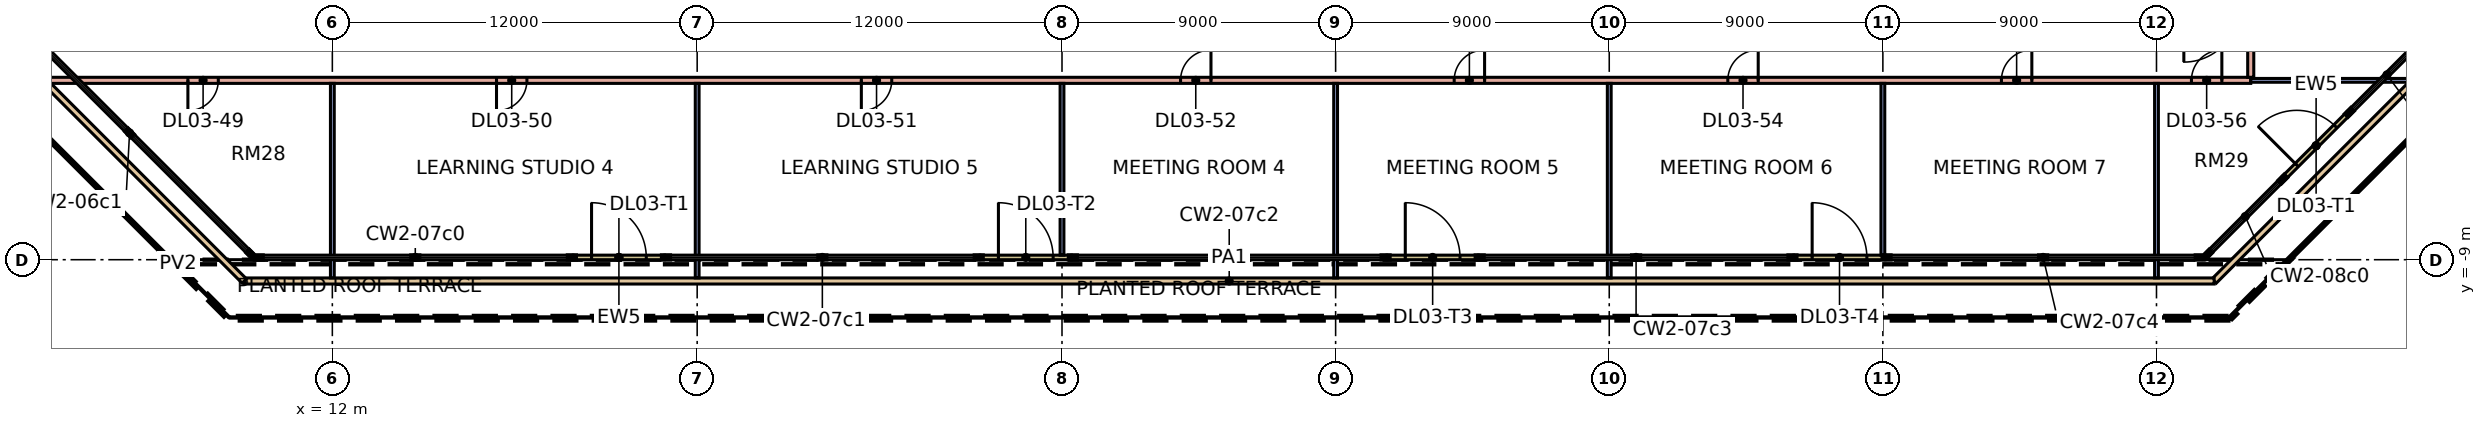
"""IFC4 building model, lengths in metres.
Left out: names, types, materials, properties, quantities, classifications, styles, units other than length and angle.
Written with IfcOpenShell. Run it as: python <this file> out.ifc"""

import sys

from ifc_helpers import new_model, si_unit, direction, frame, frame_2d, origin, place, context, subcontext, project, spatial, rectangle, extrude, element, fill, save


model = new_model("IFC4")
c1 = context("Model", 3, precision=1e-05, world=origin(), true_north=direction((0.0, 1.0)))
c2 = subcontext(c1, "Body", "Model", "MODEL_VIEW")
j1 = project(units=[si_unit("LENGTHUNIT", "METRE"), si_unit("PLANEANGLEUNIT", "RADIAN")], contexts=[c1])
p1 = place(None, origin())
s1 = spatial("IfcSite", under=j1, at=p1, CompositionType="ELEMENT")
p2 = place(p1, origin())
s2 = spatial("IfcBuilding", under=s1, at=p2, CompositionType="ELEMENT")
p3 = place(p2, frame((0.0, 0.0, 16.8)))
s3 = spatial("IfcBuildingStorey", under=s2, at=p3, CompositionType="ELEMENT", Elevation=16.8)
p4 = place(p3, frame((19.926, -8.925, 0.0), z_axis=(0.0, 0.0, 1.0), x_axis=(1.0, 0.0, 0.0)))
e1 = element("IfcWall", 1, at=p4, inside=s3, PredefinedType="SOLIDWALL", context=c2, shape_type="SweptSolid", body=[
    extrude(rectangle(XDim=3.0, YDim=0.15, at=frame_2d((1.5, 0.0))), origin(), (0.0, 0.0, 1.0), 4.4),
])
p5 = place(p4, frame((0.6, 0.0, 0.0)))
e2 = element("IfcOpeningElement", 2, at=p5, cuts=e1, PredefinedType="OPENING", context=c2, shape_type="SweptSolid", body=[
    extrude(rectangle(XDim=1.8, YDim=2.4, at=frame_2d((0.9, 1.2))), frame((0.0, 0.085, 0.0), z_axis=(0.0, -1.0, 0.0), x_axis=(1.0, 0.0, 0.0)), (0.0, 0.0, 1.0), 0.17),
])
p6 = place(p3, frame((33.309, -8.925, 0.0), z_axis=(0.0, 0.0, 1.0), x_axis=(1.0, 0.0, 0.0)))
e3 = element("IfcWall", 3, at=p6, inside=s3, PredefinedType="SOLIDWALL", context=c2, shape_type="SweptSolid", body=[
    extrude(rectangle(XDim=3.0, YDim=0.15, at=frame_2d((1.5, 0.0))), origin(), (0.0, 0.0, 1.0), 4.4),
])
p7 = place(p6, frame((0.6, 0.0, 0.0)))
e4 = element("IfcOpeningElement", 4, at=p7, cuts=e3, PredefinedType="OPENING", context=c2, shape_type="SweptSolid", body=[
    extrude(rectangle(XDim=1.8, YDim=2.4, at=frame_2d((0.9, 1.2))), frame((0.0, 0.085, 0.0), z_axis=(0.0, -1.0, 0.0), x_axis=(1.0, 0.0, 0.0)), (0.0, 0.0, 1.0), 0.17),
])
p8 = place(p3, frame((46.691, -8.925, 0.0), z_axis=(0.0, 0.0, 1.0), x_axis=(1.0, 0.0, 0.0)))
e5 = element("IfcWall", 5, at=p8, inside=s3, PredefinedType="SOLIDWALL", context=c2, shape_type="SweptSolid", body=[
    extrude(rectangle(XDim=3.0, YDim=0.15, at=frame_2d((1.5, 0.0))), origin(), (0.0, 0.0, 1.0), 4.4),
])
p9 = place(p8, frame((0.6, 0.0, 0.0)))
e6 = element("IfcOpeningElement", 6, at=p9, cuts=e5, PredefinedType="OPENING", context=c2, shape_type="SweptSolid", body=[
    extrude(rectangle(XDim=1.8, YDim=2.4, at=frame_2d((0.9, 1.2))), frame((0.0, 0.085, 0.0), z_axis=(0.0, -1.0, 0.0), x_axis=(1.0, 0.0, 0.0)), (0.0, 0.0, 1.0), 0.17),
])
p10 = place(p3, frame((60.074, -8.925, 0.0), z_axis=(0.0, 0.0, 1.0), x_axis=(1.0, 0.0, 0.0)))
e7 = element("IfcWall", 7, at=p10, inside=s3, PredefinedType="SOLIDWALL", context=c2, shape_type="SweptSolid", body=[
    extrude(rectangle(XDim=3.0, YDim=0.15, at=frame_2d((1.5, 0.0))), origin(), (0.0, 0.0, 1.0), 4.4),
])
p11 = place(p10, frame((0.6, 0.0, 0.0)))
e8 = element("IfcOpeningElement", 8, at=p11, cuts=e7, PredefinedType="OPENING", context=c2, shape_type="SweptSolid", body=[
    extrude(rectangle(XDim=1.8, YDim=2.4, at=frame_2d((0.9, 1.2))), frame((0.0, 0.085, 0.0), z_axis=(0.0, -1.0, 0.0), x_axis=(1.0, 0.0, 0.0)), (0.0, 0.0, 1.0), 0.17),
])
p12 = place(p3, frame((76.19, -6.311, 0.0), z_axis=(0.0, 0.0, 1.0), x_axis=(0.707106781187, 0.707106781187, 0.0)))
e9 = element("IfcWall", 9, at=p12, inside=s3, PredefinedType="SOLIDWALL", context=c2, shape_type="SweptSolid", body=[
    extrude(rectangle(XDim=3.0, YDim=0.15, at=frame_2d((1.5, 0.0))), origin(), (0.0, 0.0, 1.0), 4.4),
])
p13 = place(p12, frame((0.6, 0.0, 0.0)))
e10 = element("IfcOpeningElement", 10, at=p13, cuts=e9, PredefinedType="OPENING", context=c2, shape_type="SweptSolid", body=[
    extrude(rectangle(XDim=1.8, YDim=2.4, at=frame_2d((0.9, 1.2))), frame((0.0, 0.085, 0.0), z_axis=(0.0, -1.0, 0.0), x_axis=(1.0, 0.0, 0.0)), (0.0, 0.0, 1.0), 0.17),
])
p14 = place(p3, frame((81.7, -1.896, 0.0), z_axis=(0.0, 0.0, 1.0), x_axis=(-0.707106781187, -0.707106781187, 0.0)))
e11 = element("IfcWall", 11, at=p14, inside=s3, PredefinedType="PARAPET", context=c2, shape_type="SweptSolid", body=[
    extrude(rectangle(XDim=11.036, YDim=0.2, at=frame_2d((5.518, 0.0))), origin(), (0.0, 0.0, 1.0), 0.5),
])
p15 = place(p3, frame((73.896, -9.7, 0.0), z_axis=(0.0, 0.0, 1.0), x_axis=(-1.0, 0.0, 0.0)))
e12 = element("IfcWall", 12, at=p15, inside=s3, PredefinedType="PARAPET", context=c2, shape_type="SweptSolid", body=[
    extrude(rectangle(XDim=64.793, YDim=0.2, at=frame_2d((32.396, 0.0))), origin(), (0.0, 0.0, 1.0), 0.5),
])
p16 = place(p3, frame((9.104, -9.7, 0.0), z_axis=(0.0, 0.0, 1.0), x_axis=(-0.707106781187, 0.707106781187, 0.0)))
e13 = element("IfcWall", 13, at=p16, inside=s3, PredefinedType="PARAPET", context=c2, shape_type="SweptSolid", body=[
    extrude(rectangle(XDim=26.592, YDim=0.2, at=frame_2d((13.296, 0.0))), origin(), (0.0, 0.0, 1.0), 0.5),
])
p17 = place(p3, frame((2.645, -3.1, 0.0), z_axis=(0.0, 0.0, 1.0), x_axis=(1.0, 0.0, 0.0)))
e14 = element("IfcWall", 14, at=p17, inside=s3, PredefinedType="PARTITIONING", context=c2, shape_type="SweptSolid", body=[
    extrude(rectangle(XDim=72.455, YDim=0.2, at=frame_2d((36.228, 0.0))), origin(), (0.0, 0.0, 1.0), 4.4),
])
p18 = place(p17, frame((4.604, 0.0, 0.0)))
e15 = element("IfcOpeningElement", 15, at=p18, cuts=e14, PredefinedType="OPENING", context=c2, shape_type="SweptSolid", body=[
    extrude(rectangle(XDim=1.0, YDim=2.1, at=frame_2d((0.5, 1.05))), frame((0.0, 0.11, 0.0), z_axis=(0.0, -1.0, 0.0), x_axis=(1.0, 0.0, 0.0)), (0.0, 0.0, 1.0), 0.22),
])
p19 = place(p17, frame((14.755, 0.0, 0.0)))
e16 = element("IfcOpeningElement", 16, at=p19, cuts=e14, PredefinedType="OPENING", context=c2, shape_type="SweptSolid", body=[
    extrude(rectangle(XDim=1.0, YDim=2.1, at=frame_2d((0.5, 1.05))), frame((0.0, 0.11, 0.0), z_axis=(0.0, -1.0, 0.0), x_axis=(1.0, 0.0, 0.0)), (0.0, 0.0, 1.0), 0.22),
])
p20 = place(p17, frame((26.755, 0.0, 0.0)))
e17 = element("IfcOpeningElement", 17, at=p20, cuts=e14, PredefinedType="OPENING", context=c2, shape_type="SweptSolid", body=[
    extrude(rectangle(XDim=1.0, YDim=2.1, at=frame_2d((0.5, 1.05))), frame((0.0, 0.11, 0.0), z_axis=(0.0, -1.0, 0.0), x_axis=(1.0, 0.0, 0.0)), (0.0, 0.0, 1.0), 0.22),
])
p21 = place(p17, frame((37.255, 0.0, 0.0)))
e18 = element("IfcOpeningElement", 18, at=p21, cuts=e14, PredefinedType="OPENING", context=c2, shape_type="SweptSolid", body=[
    extrude(rectangle(XDim=1.0, YDim=2.1, at=frame_2d((0.5, 1.05))), frame((0.0, 0.11, 0.0), z_axis=(0.0, -1.0, 0.0), x_axis=(1.0, 0.0, 0.0)), (0.0, 0.0, 1.0), 0.22),
])
p22 = place(p17, frame((46.255, 0.0, 0.0)))
e19 = element("IfcOpeningElement", 19, at=p22, cuts=e14, PredefinedType="OPENING", context=c2, shape_type="SweptSolid", body=[
    extrude(rectangle(XDim=1.0, YDim=2.1, at=frame_2d((0.5, 1.05))), frame((0.0, 0.11, 0.0), z_axis=(0.0, -1.0, 0.0), x_axis=(1.0, 0.0, 0.0)), (0.0, 0.0, 1.0), 0.22),
])
p23 = place(p17, frame((55.255, 0.0, 0.0)))
e20 = element("IfcOpeningElement", 20, at=p23, cuts=e14, PredefinedType="OPENING", context=c2, shape_type="SweptSolid", body=[
    extrude(rectangle(XDim=1.0, YDim=2.1, at=frame_2d((0.5, 1.05))), frame((0.0, 0.11, 0.0), z_axis=(0.0, -1.0, 0.0), x_axis=(1.0, 0.0, 0.0)), (0.0, 0.0, 1.0), 0.22),
])
p24 = place(p17, frame((64.255, 0.0, 0.0)))
e21 = element("IfcOpeningElement", 21, at=p24, cuts=e14, PredefinedType="OPENING", context=c2, shape_type="SweptSolid", body=[
    extrude(rectangle(XDim=1.0, YDim=2.1, at=frame_2d((0.5, 1.05))), frame((0.0, 0.11, 0.0), z_axis=(0.0, -1.0, 0.0), x_axis=(1.0, 0.0, 0.0)), (0.0, 0.0, 1.0), 0.22),
])
p25 = place(p17, frame((70.505, 0.0, 0.0)))
e22 = element("IfcOpeningElement", 22, at=p25, cuts=e14, PredefinedType="OPENING", context=c2, shape_type="SweptSolid", body=[
    extrude(rectangle(XDim=1.0, YDim=2.1, at=frame_2d((0.5, 1.05))), frame((0.0, 0.11, 0.0), z_axis=(0.0, -1.0, 0.0), x_axis=(1.0, 0.0, 0.0)), (0.0, 0.0, 1.0), 0.22),
])
for number, where, z_axis, x_axis in (
    (23, (12.0, -9.6, 0.0), (0.0, 0.0, 1.0), (0.0, 1.0, 0.0)),
    (24, (24.0, -9.6, 0.0), (0.0, 0.0, 1.0), (0.0, 1.0, 0.0)),
):
    element("IfcWall", number, at=place(p3, frame(where, z_axis=z_axis, x_axis=x_axis)), inside=s3, PredefinedType="PARTITIONING", context=c2, shape_type="SweptSolid", body=[
        extrude(rectangle(XDim=6.4, YDim=0.125, at=frame_2d((3.2, 0.0))), origin(), (0.0, 0.0, 1.0), 4.4),
    ])
p26 = place(p3, frame((36.0, -8.851, 0.0), z_axis=(0.0, 0.0, 1.0), x_axis=(0.0, 1.0, 0.0)))
e25 = element("IfcWall", 25, at=p26, inside=s3, PredefinedType="PARTITIONING", context=c2, shape_type="SweptSolid", body=[
    extrude(rectangle(XDim=5.651, YDim=0.125, at=frame_2d((2.826, 0.0))), origin(), (0.0, 0.0, 1.0), 4.4),
])
for number, where, z_axis, x_axis in (
    (26, (45.0, -9.6, 0.0), (0.0, 0.0, 1.0), (0.0, 1.0, 0.0)),
    (27, (54.0, -9.6, 0.0), (0.0, 0.0, 1.0), (0.0, 1.0, 0.0)),
):
    element("IfcWall", number, at=place(p3, frame(where, z_axis=z_axis, x_axis=x_axis)), inside=s3, PredefinedType="PARTITIONING", context=c2, shape_type="SweptSolid", body=[
        extrude(rectangle(XDim=6.4, YDim=0.125, at=frame_2d((3.2, 0.0))), origin(), (0.0, 0.0, 1.0), 4.4),
    ])
p27 = place(p3, frame((63.0, -8.851, 0.0), z_axis=(0.0, 0.0, 1.0), x_axis=(0.0, 1.0, 0.0)))
e28 = element("IfcWall", 28, at=p27, inside=s3, PredefinedType="PARTITIONING", context=c2, shape_type="SweptSolid", body=[
    extrude(rectangle(XDim=5.651, YDim=0.125, at=frame_2d((2.826, 0.0))), origin(), (0.0, 0.0, 1.0), 4.4),
])
p28 = place(p3, frame((72.0, -9.6, 0.0), z_axis=(0.0, 0.0, 1.0), x_axis=(0.0, 1.0, 0.0)))
e29 = element("IfcWall", 29, at=p28, inside=s3, PredefinedType="PARTITIONING", context=c2, shape_type="SweptSolid", body=[
    extrude(rectangle(XDim=6.4, YDim=0.125, at=frame_2d((3.2, 0.0))), origin(), (0.0, 0.0, 1.0), 4.4),
])
p29 = place(p3, frame((75.1, -3.1, 0.0), z_axis=(0.0, 0.0, 1.0), x_axis=(1.0, 0.0, 0.0)))
e30 = element("IfcWall", 30, at=p29, inside=s3, PredefinedType="PARTITIONING", context=c2, shape_type="SweptSolid", body=[
    extrude(rectangle(XDim=5.255, YDim=0.125, at=frame_2d((2.627, 0.0))), origin(), (0.0, 0.0, 1.0), 4.4),
])
p30 = place(p3, frame((75.1, -3.0, 0.0), z_axis=(0.0, 0.0, 1.0), x_axis=(0.0, 1.0, 0.0)))
e31 = element("IfcWall", 31, at=p30, inside=s3, PredefinedType="PARTITIONING", context=c2, shape_type="SweptSolid", body=[
    extrude(rectangle(XDim=30.0, YDim=0.2, at=frame_2d((15.0, 0.0))), origin(), (0.0, 0.0, 1.0), 4.4),
])
p31 = place(p30, frame((8.4, 0.0, 0.0)))
e32 = element("IfcOpeningElement", 32, at=p31, cuts=e31, PredefinedType="OPENING", context=c2, shape_type="SweptSolid", body=[
    extrude(rectangle(XDim=1.0, YDim=2.1, at=frame_2d((0.5, 1.05))), frame((0.0, 0.11, 0.0), z_axis=(0.0, -1.0, 0.0), x_axis=(1.0, 0.0, 0.0)), (0.0, 0.0, 1.0), 0.22),
])
p32 = place(p30, frame((22.25, 0.0, 0.0)))
e33 = element("IfcOpeningElement", 33, at=p32, cuts=e31, PredefinedType="OPENING", context=c2, shape_type="SweptSolid", body=[
    extrude(rectangle(XDim=1.0, YDim=2.1, at=frame_2d((0.5, 1.05))), frame((0.0, 0.11, 0.0), z_axis=(0.0, -1.0, 0.0), x_axis=(1.0, 0.0, 0.0)), (0.0, 0.0, 1.0), 0.22),
])
p33 = place(p5, origin())
e34 = element("IfcDoor", 34, at=p33, inside=s3, OperationType="DOUBLE_DOOR_SINGLE_SWING", PredefinedType="DOOR", context=c2, shape_type="SweptSolid", body=[
    extrude(rectangle(XDim=1.8, YDim=2.4, at=frame_2d((0.9, 1.2))), frame((0.0, 0.025, 0.0), z_axis=(0.0, -1.0, 0.0), x_axis=(1.0, 0.0, 0.0)), (0.0, 0.0, 1.0), 0.05),
])
fill(e2, e34)
p34 = place(p7, origin())
e35 = element("IfcDoor", 35, at=p34, inside=s3, OperationType="DOUBLE_DOOR_SINGLE_SWING", PredefinedType="DOOR", context=c2, shape_type="SweptSolid", body=[
    extrude(rectangle(XDim=1.8, YDim=2.4, at=frame_2d((0.9, 1.2))), frame((0.0, 0.025, 0.0), z_axis=(0.0, -1.0, 0.0), x_axis=(1.0, 0.0, 0.0)), (0.0, 0.0, 1.0), 0.05),
])
fill(e4, e35)
p35 = place(p9, origin())
e36 = element("IfcDoor", 36, at=p35, inside=s3, OperationType="DOUBLE_DOOR_SINGLE_SWING", PredefinedType="DOOR", context=c2, shape_type="SweptSolid", body=[
    extrude(rectangle(XDim=1.8, YDim=2.4, at=frame_2d((0.9, 1.2))), frame((0.0, 0.025, 0.0), z_axis=(0.0, -1.0, 0.0), x_axis=(1.0, 0.0, 0.0)), (0.0, 0.0, 1.0), 0.05),
])
fill(e6, e36)
p36 = place(p11, origin())
e37 = element("IfcDoor", 37, at=p36, inside=s3, OperationType="DOUBLE_DOOR_SINGLE_SWING", PredefinedType="DOOR", context=c2, shape_type="SweptSolid", body=[
    extrude(rectangle(XDim=1.8, YDim=2.4, at=frame_2d((0.9, 1.2))), frame((0.0, 0.025, 0.0), z_axis=(0.0, -1.0, 0.0), x_axis=(1.0, 0.0, 0.0)), (0.0, 0.0, 1.0), 0.05),
])
fill(e8, e37)
p37 = place(p13, origin())
e38 = element("IfcDoor", 38, at=p37, inside=s3, OperationType="DOUBLE_DOOR_SINGLE_SWING", PredefinedType="DOOR", context=c2, shape_type="SweptSolid", body=[
    extrude(rectangle(XDim=1.8, YDim=2.4, at=frame_2d((0.9, 1.2))), frame((0.0, 0.025, 0.0), z_axis=(0.0, -1.0, 0.0), x_axis=(1.0, 0.0, 0.0)), (0.0, 0.0, 1.0), 0.05),
])
fill(e10, e38)
p38 = place(p18, frame((1.0, 0.0, 0.0), z_axis=(0.0, 0.0, 1.0), x_axis=(-1.0, 0.0, 0.0)))
e39 = element("IfcDoor", 39, at=p38, inside=s3, OperationType="SINGLE_SWING_LEFT", PredefinedType="DOOR", context=c2, shape_type="SweptSolid", body=[
    extrude(rectangle(XDim=1.0, YDim=2.1, at=frame_2d((0.5, 1.05))), frame((0.0, 0.025, 0.0), z_axis=(0.0, -1.0, 0.0), x_axis=(1.0, 0.0, 0.0)), (0.0, 0.0, 1.0), 0.05),
])
fill(e15, e39)
p39 = place(p19, frame((1.0, 0.0, 0.0), z_axis=(0.0, 0.0, 1.0), x_axis=(-1.0, 0.0, 0.0)))
e40 = element("IfcDoor", 40, at=p39, inside=s3, OperationType="SINGLE_SWING_LEFT", PredefinedType="DOOR", context=c2, shape_type="SweptSolid", body=[
    extrude(rectangle(XDim=1.0, YDim=2.1, at=frame_2d((0.5, 1.05))), frame((0.0, 0.025, 0.0), z_axis=(0.0, -1.0, 0.0), x_axis=(1.0, 0.0, 0.0)), (0.0, 0.0, 1.0), 0.05),
])
fill(e16, e40)
p40 = place(p20, frame((1.0, 0.0, 0.0), z_axis=(0.0, 0.0, 1.0), x_axis=(-1.0, 0.0, 0.0)))
e41 = element("IfcDoor", 41, at=p40, inside=s3, OperationType="SINGLE_SWING_LEFT", PredefinedType="DOOR", context=c2, shape_type="SweptSolid", body=[
    extrude(rectangle(XDim=1.0, YDim=2.1, at=frame_2d((0.5, 1.05))), frame((0.0, 0.025, 0.0), z_axis=(0.0, -1.0, 0.0), x_axis=(1.0, 0.0, 0.0)), (0.0, 0.0, 1.0), 0.05),
])
fill(e17, e41)
p41 = place(p21, frame((1.0, 0.0, 0.0), z_axis=(0.0, 0.0, 1.0), x_axis=(-1.0, 0.0, 0.0)))
e42 = element("IfcDoor", 42, at=p41, inside=s3, OperationType="SINGLE_SWING_RIGHT", PredefinedType="DOOR", context=c2, shape_type="SweptSolid", body=[
    extrude(rectangle(XDim=1.0, YDim=2.1, at=frame_2d((0.5, 1.05))), frame((0.0, 0.025, 0.0), z_axis=(0.0, -1.0, 0.0), x_axis=(1.0, 0.0, 0.0)), (0.0, 0.0, 1.0), 0.05),
])
fill(e18, e42)
p42 = place(p22, frame((1.0, 0.0, 0.0), z_axis=(0.0, 0.0, 1.0), x_axis=(-1.0, 0.0, 0.0)))
e43 = element("IfcDoor", 43, at=p42, inside=s3, OperationType="SINGLE_SWING_RIGHT", PredefinedType="DOOR", context=c2, shape_type="SweptSolid", body=[
    extrude(rectangle(XDim=1.0, YDim=2.1, at=frame_2d((0.5, 1.05))), frame((0.0, 0.025, 0.0), z_axis=(0.0, -1.0, 0.0), x_axis=(1.0, 0.0, 0.0)), (0.0, 0.0, 1.0), 0.05),
])
fill(e19, e43)
p43 = place(p23, frame((1.0, 0.0, 0.0), z_axis=(0.0, 0.0, 1.0), x_axis=(-1.0, 0.0, 0.0)))
e44 = element("IfcDoor", 44, at=p43, inside=s3, OperationType="SINGLE_SWING_RIGHT", PredefinedType="DOOR", context=c2, shape_type="SweptSolid", body=[
    extrude(rectangle(XDim=1.0, YDim=2.1, at=frame_2d((0.5, 1.05))), frame((0.0, 0.025, 0.0), z_axis=(0.0, -1.0, 0.0), x_axis=(1.0, 0.0, 0.0)), (0.0, 0.0, 1.0), 0.05),
])
fill(e20, e44)
p44 = place(p24, frame((1.0, 0.0, 0.0), z_axis=(0.0, 0.0, 1.0), x_axis=(-1.0, 0.0, 0.0)))
e45 = element("IfcDoor", 45, at=p44, inside=s3, OperationType="SINGLE_SWING_RIGHT", PredefinedType="DOOR", context=c2, shape_type="SweptSolid", body=[
    extrude(rectangle(XDim=1.0, YDim=2.1, at=frame_2d((0.5, 1.05))), frame((0.0, 0.025, 0.0), z_axis=(0.0, -1.0, 0.0), x_axis=(1.0, 0.0, 0.0)), (0.0, 0.0, 1.0), 0.05),
])
fill(e21, e45)
p45 = place(p25, frame((1.0, 0.0, 0.0), z_axis=(0.0, 0.0, 1.0), x_axis=(-1.0, 0.0, 0.0)))
e46 = element("IfcDoor", 46, at=p45, inside=s3, OperationType="SINGLE_SWING_RIGHT", PredefinedType="DOOR", context=c2, shape_type="SweptSolid", body=[
    extrude(rectangle(XDim=1.0, YDim=2.1, at=frame_2d((0.5, 1.05))), frame((0.0, 0.025, 0.0), z_axis=(0.0, -1.0, 0.0), x_axis=(1.0, 0.0, 0.0)), (0.0, 0.0, 1.0), 0.05),
])
fill(e22, e46)
save(model, sys.argv[1])
